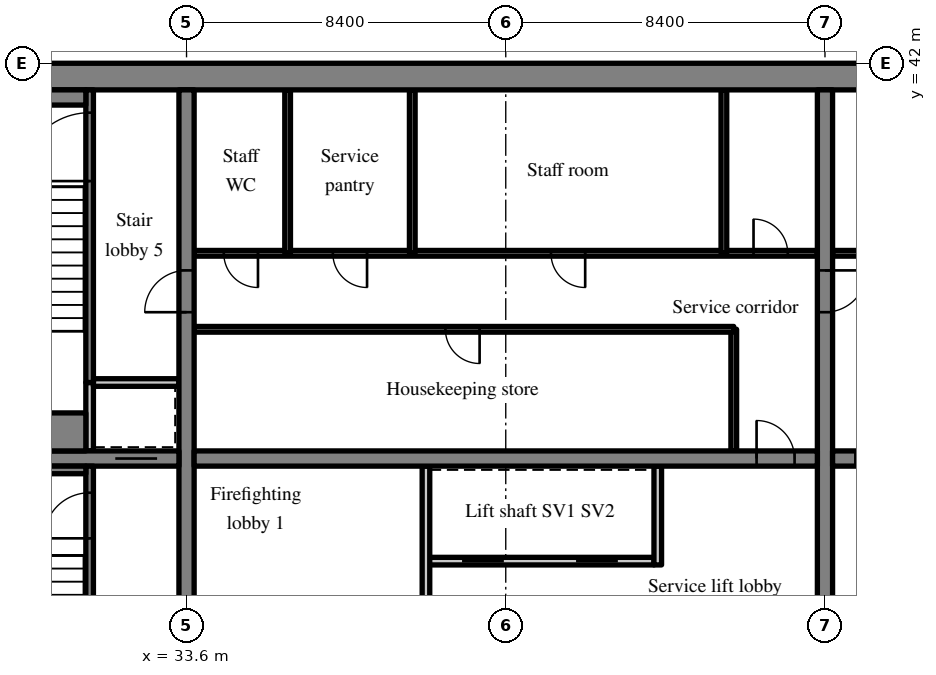
"""IFC4 building model, lengths in metres.
Left out: names, types, materials, properties, quantities, classifications, styles, units other than length and angle.
Written with IfcOpenShell. Run it as: python <this file> out.ifc"""

import sys

from ifc_helpers import new_model, si_unit, direction, frame, frame_2d, origin, place, context, subcontext, project, spatial, rectangle, extrude, source, transform, mapped, element, fill, save


model = new_model("IFC4")
c1 = context("Model", 3, precision=1e-05, world=origin(), true_north=direction((0.0, 1.0)))
c2 = subcontext(c1, "Body", "Model", "MODEL_VIEW")
j1 = project(units=[si_unit("LENGTHUNIT", "METRE"), si_unit("PLANEANGLEUNIT", "RADIAN")], contexts=[c1])
p1 = place(None, origin())
s1 = spatial("IfcSite", under=j1, at=p1, CompositionType="ELEMENT")
p2 = place(p1, origin())
s2 = spatial("IfcBuilding", under=s1, at=p2, CompositionType="ELEMENT")
p3 = place(p2, frame((0.0, 0.0, 151.6)))
s3 = spatial("IfcBuildingStorey", under=s2, at=p3, CompositionType="ELEMENT", Elevation=151.6)
m1 = source(origin(), c2, "Body", "SweptSolid", [
    extrude(rectangle(XDim=50.4, YDim=0.7, at=frame_2d((25.2, 0.0))), origin(), (0.0, 0.0, 1.0), 3.52),
])
p4 = place(p3, frame((25.2, 41.65, 0.0), z_axis=(0.0, 0.0, 1.0), x_axis=(1.0, 0.0, 0.0)))
e1 = element("IfcWall", 1, at=p4, inside=s3, PredefinedType="SHEAR", context=c2, shape_type="MappedRepresentation", body=[
    mapped(m1, transform((0.0, 0.0, 0.0), scale=1.0)),
])
m2 = source(origin(), c2, "Body", "SweptSolid", [
    extrude(rectangle(XDim=18.6, YDim=0.4, at=frame_2d((9.3, 0.0))), origin(), (0.0, 0.0, 1.0), 3.52),
])
p5 = place(p3, frame((33.6, 22.7, 0.0), z_axis=(0.0, 0.0, 1.0), x_axis=(0.0, 1.0, 0.0)))
e2 = element("IfcWall", 2, at=p5, inside=s3, PredefinedType="SHEAR", context=c2, shape_type="MappedRepresentation", body=[
    mapped(m2, transform((0.0, 0.0, 0.0), scale=1.0)),
])
m3 = source(origin(), c2, "Body", "SweptSolid", [
    extrude(rectangle(XDim=1.1, YDim=2.1, at=frame_2d((0.55, 1.05))), frame((0.0, 0.21, 0.0), z_axis=(0.0, -1.0, 0.0), x_axis=(1.0, 0.0, 0.0)), (0.0, 0.0, 1.0), 0.42),
])
p6 = place(p5, frame((12.75, 0.0, 0.0)))
e3 = element("IfcOpeningElement", 3, at=p6, cuts=e2, PredefinedType="OPENING", context=c2, shape_type="MappedRepresentation", body=[
    mapped(m3, transform((0.0, 0.0, 0.0), scale=1.0)),
])
p7 = place(p3, frame((50.4, 22.7, 0.0), z_axis=(0.0, 0.0, 1.0), x_axis=(0.0, 1.0, 0.0)))
e4 = element("IfcWall", 4, at=p7, inside=s3, PredefinedType="SHEAR", context=c2, shape_type="MappedRepresentation", body=[
    mapped(m2, transform((0.0, 0.0, 0.0), scale=1.0)),
])
p8 = place(p7, frame((12.75, 0.0, 0.0)))
e5 = element("IfcOpeningElement", 5, at=p8, cuts=e4, PredefinedType="OPENING", context=c2, shape_type="MappedRepresentation", body=[
    mapped(m3, transform((0.0, 0.0, 0.0), scale=1.0)),
])
m4 = source(origin(), c2, "Body", "SweptSolid", [
    extrude(rectangle(XDim=7.5, YDim=0.4, at=frame_2d((3.75, 0.0))), origin(), (0.0, 0.0, 1.0), 3.52),
])
p9 = place(p3, frame((25.9, 31.6, 0.0), z_axis=(0.0, 0.0, 1.0), x_axis=(1.0, 0.0, 0.0)))
e6 = element("IfcWall", 6, at=p9, inside=s3, PredefinedType="SHEAR", context=c2, shape_type="MappedRepresentation", body=[
    mapped(m4, transform((0.0, 0.0, 0.0), scale=1.0)),
])
p10 = place(p9, frame((5.825, 0.0, 0.0)))
e7 = element("IfcOpeningElement", 7, at=p10, cuts=e6, PredefinedType="OPENING", context=c2, shape_type="MappedRepresentation", body=[
    mapped(m3, transform((0.0, 0.0, 0.0), scale=1.0)),
])
m5 = source(origin(), c2, "Body", "SweptSolid", [
    extrude(rectangle(XDim=16.4, YDim=0.4, at=frame_2d((8.2, 0.0))), origin(), (0.0, 0.0, 1.0), 3.52),
])
p11 = place(p3, frame((33.8, 31.6, 0.0), z_axis=(0.0, 0.0, 1.0), x_axis=(1.0, 0.0, 0.0)))
e8 = element("IfcWall", 8, at=p11, inside=s3, PredefinedType="SHEAR", context=c2, shape_type="MappedRepresentation", body=[
    mapped(m5, transform((0.0, 0.0, 0.0), scale=1.0)),
])
m6 = source(origin(), c2, "Body", "SweptSolid", [
    extrude(rectangle(XDim=1.0, YDim=2.1, at=frame_2d((0.5, 1.05))), frame((0.0, 0.21, 0.0), z_axis=(0.0, -1.0, 0.0), x_axis=(1.0, 0.0, 0.0)), (0.0, 0.0, 1.0), 0.42),
])
p12 = place(p11, frame((14.8, 0.0, 0.0)))
e9 = element("IfcOpeningElement", 9, at=p12, cuts=e8, PredefinedType="OPENING", context=c2, shape_type="MappedRepresentation", body=[
    mapped(m6, transform((0.0, 0.0, 0.0), scale=1.0)),
])
p13 = place(p3, frame((50.6, 31.6, 0.0), z_axis=(0.0, 0.0, 1.0), x_axis=(1.0, 0.0, 0.0)))
e10 = element("IfcWall", 10, at=p13, inside=s3, PredefinedType="SHEAR", context=c2, shape_type="MappedRepresentation", body=[
    mapped(m5, transform((0.0, 0.0, 0.0), scale=1.0)),
])
p14 = place(p13, frame((0.6, 0.0, 0.0)))
e11 = element("IfcOpeningElement", 11, at=p14, cuts=e10, PredefinedType="OPENING", context=c2, shape_type="MappedRepresentation", body=[
    mapped(m6, transform((0.0, 0.0, 0.0), scale=1.0)),
])
m7 = source(origin(), c2, "Body", "SweptSolid", [
    extrude(rectangle(XDim=6.0, YDim=0.2, at=frame_2d((3.0, 0.0))), origin(), (0.0, 0.0, 1.0), 3.52),
])
p15 = place(p3, frame((39.9, 28.9, 0.0), z_axis=(0.0, 0.0, 1.0), x_axis=(1.0, 0.0, 0.0)))
e12 = element("IfcWall", 12, at=p15, inside=s3, PredefinedType="SOLIDWALL", context=c2, shape_type="MappedRepresentation", body=[
    mapped(m7, transform((0.0, 0.0, 0.0), scale=1.0)),
])
m8 = source(origin(), c2, "Body", "SweptSolid", [
    extrude(rectangle(XDim=1.1, YDim=2.1, at=frame_2d((0.55, 1.05))), frame((0.0, 0.11, 0.0), z_axis=(0.0, -1.0, 0.0), x_axis=(1.0, 0.0, 0.0)), (0.0, 0.0, 1.0), 0.22),
])
p16 = place(p15, frame((0.95, 0.0, 0.0)))
e13 = element("IfcOpeningElement", 13, at=p16, cuts=e12, PredefinedType="OPENING", context=c2, shape_type="MappedRepresentation", body=[
    mapped(m8, transform((0.0, 0.0, 0.0), scale=1.0)),
])
p17 = place(p15, frame((3.95, 0.0, 0.0)))
e14 = element("IfcOpeningElement", 14, at=p17, cuts=e12, PredefinedType="OPENING", context=c2, shape_type="MappedRepresentation", body=[
    mapped(m8, transform((0.0, 0.0, 0.0), scale=1.0)),
])
m9 = source(origin(), c2, "Body", "SweptSolid", [
    extrude(rectangle(XDim=8.7, YDim=0.2, at=frame_2d((4.35, 0.0))), origin(), (0.0, 0.0, 1.0), 3.52),
])
p18 = place(p3, frame((39.9, 22.7, 0.0), z_axis=(0.0, 0.0, 1.0), x_axis=(0.0, 1.0, 0.0)))
e15 = element("IfcWall", 15, at=p18, inside=s3, PredefinedType="PARTITIONING", context=c2, shape_type="MappedRepresentation", body=[
    mapped(m9, transform((0.0, 0.0, 0.0), scale=1.0)),
])
m10 = source(origin(), c2, "Body", "SweptSolid", [
    extrude(rectangle(XDim=0.9, YDim=2.1, at=frame_2d((0.45, 1.05))), frame((0.0, 0.11, 0.0), z_axis=(0.0, -1.0, 0.0), x_axis=(1.0, 0.0, 0.0)), (0.0, 0.0, 1.0), 0.22),
])
p19 = place(p18, frame((3.85, 0.0, 0.0)))
e16 = element("IfcOpeningElement", 16, at=p19, cuts=e15, PredefinedType="OPENING", context=c2, shape_type="MappedRepresentation", body=[
    mapped(m10, transform((0.0, 0.0, 0.0), scale=1.0)),
])
m11 = source(origin(), c2, "Body", "SweptSolid", [
    extrude(rectangle(XDim=2.6, YDim=0.2, at=frame_2d((1.3, 0.0))), origin(), (0.0, 0.0, 1.0), 3.52),
])
p20 = place(p3, frame((46.0, 28.8, 0.0), z_axis=(0.0, 0.0, 1.0), x_axis=(0.0, 1.0, 0.0)))
e17 = element("IfcWall", 17, at=p20, inside=s3, PredefinedType="SOLIDWALL", context=c2, shape_type="MappedRepresentation", body=[
    mapped(m11, transform((0.0, 0.0, 0.0), scale=1.0)),
])
m12 = source(origin(), c2, "Body", "SweptSolid", [
    extrude(rectangle(XDim=3.2, YDim=0.15, at=frame_2d((1.6, 0.0))), origin(), (0.0, 0.0, 1.0), 3.52),
])
p21 = place(p3, frame((48.0, 31.8, 0.0), z_axis=(0.0, 0.0, 1.0), x_axis=(0.0, 1.0, 0.0)))
e18 = element("IfcWall", 18, at=p21, inside=s3, PredefinedType="PARTITIONING", context=c2, shape_type="MappedRepresentation", body=[
    mapped(m12, transform((0.0, 0.0, 0.0), scale=1.0)),
])
m13 = source(origin(), c2, "Body", "SweptSolid", [
    extrude(rectangle(XDim=14.2, YDim=0.15, at=frame_2d((7.1, 0.0))), origin(), (0.0, 0.0, 1.0), 3.52),
])
p22 = place(p3, frame((33.8, 35.0, 0.0), z_axis=(0.0, 0.0, 1.0), x_axis=(1.0, 0.0, 0.0)))
e19 = element("IfcWall", 19, at=p22, inside=s3, PredefinedType="PARTITIONING", context=c2, shape_type="MappedRepresentation", body=[
    mapped(m13, transform((0.0, 0.0, 0.0), scale=1.0)),
])
m14 = source(origin(), c2, "Body", "SweptSolid", [
    extrude(rectangle(XDim=0.9, YDim=2.1, at=frame_2d((0.45, 1.05))), frame((0.0, 0.085, 0.0), z_axis=(0.0, -1.0, 0.0), x_axis=(1.0, 0.0, 0.0)), (0.0, 0.0, 1.0), 0.17),
])
p23 = place(p22, frame((6.612, 0.0, 0.0)))
e20 = element("IfcOpeningElement", 20, at=p23, cuts=e19, PredefinedType="OPENING", context=c2, shape_type="MappedRepresentation", body=[
    mapped(m14, transform((0.0, 0.0, 0.0), scale=1.0)),
])
m15 = source(origin(), c2, "Body", "SweptSolid", [
    extrude(rectangle(XDim=16.4, YDim=0.15, at=frame_2d((8.2, 0.0))), origin(), (0.0, 0.0, 1.0), 3.52),
])
p24 = place(p3, frame((33.8, 37.0, 0.0), z_axis=(0.0, 0.0, 1.0), x_axis=(1.0, 0.0, 0.0)))
e21 = element("IfcWall", 21, at=p24, inside=s3, PredefinedType="PARTITIONING", context=c2, shape_type="MappedRepresentation", body=[
    mapped(m15, transform((0.0, 0.0, 0.0), scale=1.0)),
])
p25 = place(p24, frame((0.78, 0.0, 0.0)))
e22 = element("IfcOpeningElement", 22, at=p25, cuts=e21, PredefinedType="OPENING", context=c2, shape_type="MappedRepresentation", body=[
    mapped(m14, transform((0.0, 0.0, 0.0), scale=1.0)),
])
p26 = place(p24, frame((3.65, 0.0, 0.0)))
e23 = element("IfcOpeningElement", 23, at=p26, cuts=e21, PredefinedType="OPENING", context=c2, shape_type="MappedRepresentation", body=[
    mapped(m14, transform((0.0, 0.0, 0.0), scale=1.0)),
])
p27 = place(p24, frame((9.39, 0.0, 0.0)))
e24 = element("IfcOpeningElement", 24, at=p27, cuts=e21, PredefinedType="OPENING", context=c2, shape_type="MappedRepresentation", body=[
    mapped(m14, transform((0.0, 0.0, 0.0), scale=1.0)),
])
p28 = place(p24, frame((14.72, 0.0, 0.0)))
e25 = element("IfcOpeningElement", 25, at=p28, cuts=e21, PredefinedType="OPENING", context=c2, shape_type="MappedRepresentation", body=[
    mapped(m14, transform((0.0, 0.0, 0.0), scale=1.0)),
])
m16 = source(origin(), c2, "Body", "SweptSolid", [
    extrude(rectangle(XDim=4.3, YDim=0.15, at=frame_2d((2.15, 0.0))), origin(), (0.0, 0.0, 1.0), 3.52),
])
for number, where, z_axis, x_axis in (
    (26, (36.26, 37.0, 0.0), (0.0, 0.0, 1.0), (0.0, 1.0, 0.0)),
    (27, (39.54, 37.0, 0.0), (0.0, 0.0, 1.0), (0.0, 1.0, 0.0)),
    (28, (47.74, 37.0, 0.0), (0.0, 0.0, 1.0), (0.0, 1.0, 0.0)),
):
    element("IfcWall", number, at=place(p3, frame(where, z_axis=z_axis, x_axis=x_axis)), inside=s3, PredefinedType="PARTITIONING", context=c2, shape_type="MappedRepresentation", body=[
        mapped(m16, transform((0.0, 0.0, 0.0), scale=1.0)),
    ])
p29 = place(p3, frame((67.0, 37.0, 0.0), z_axis=(0.0, 0.0, 1.0), x_axis=(-1.0, 0.0, 0.0)))
e29 = element("IfcWall", 29, at=p29, inside=s3, PredefinedType="PARTITIONING", context=c2, shape_type="MappedRepresentation", body=[
    mapped(m15, transform((0.0, 0.0, 0.0), scale=1.0)),
])
p30 = place(p29, frame((6.52, 0.0, 0.0)))
e30 = element("IfcOpeningElement", 30, at=p30, cuts=e29, PredefinedType="OPENING", context=c2, shape_type="MappedRepresentation", body=[
    mapped(m14, transform((0.0, 0.0, 0.0), scale=1.0)),
])
p31 = place(p29, frame((14.72, 0.0, 0.0)))
e31 = element("IfcOpeningElement", 31, at=p31, cuts=e29, PredefinedType="OPENING", context=c2, shape_type="MappedRepresentation", body=[
    mapped(m14, transform((0.0, 0.0, 0.0), scale=1.0)),
])
m17 = source(origin(), c2, "Body", "SweptSolid", [
    extrude(rectangle(XDim=8.7, YDim=0.2, at=frame_2d((4.35, 0.0))), origin(), (0.0, 0.0, 1.0), 3.52),
])
p32 = place(p3, frame((31.05, 22.7, 0.0), z_axis=(0.0, 0.0, 1.0), x_axis=(0.0, 1.0, 0.0)))
e32 = element("IfcWall", 32, at=p32, inside=s3, PredefinedType="SOLIDWALL", context=c2, shape_type="MappedRepresentation", body=[
    mapped(m17, transform((0.0, 0.0, 0.0), scale=1.0)),
])
m18 = source(origin(), c2, "Body", "SweptSolid", [
    extrude(rectangle(XDim=1.2, YDim=2.1, at=frame_2d((0.6, 1.05))), frame((0.0, 0.11, 0.0), z_axis=(0.0, -1.0, 0.0), x_axis=(1.0, 0.0, 0.0)), (0.0, 0.0, 1.0), 0.22),
])
p33 = place(p32, frame((6.8, 0.0, 0.0)))
e33 = element("IfcOpeningElement", 33, at=p33, cuts=e32, PredefinedType="OPENING", context=c2, shape_type="MappedRepresentation", body=[
    mapped(m18, transform((0.0, 0.0, 0.0), scale=1.0)),
])
m19 = source(origin(), c2, "Body", "SweptSolid", [
    extrude(rectangle(XDim=1.8, YDim=0.2, at=frame_2d((0.9, 0.0))), origin(), (0.0, 0.0, 1.0), 3.52),
])
p34 = place(p3, frame((31.05, 31.8, 0.0), z_axis=(0.0, 0.0, 1.0), x_axis=(0.0, 1.0, 0.0)))
e34 = element("IfcWall", 34, at=p34, inside=s3, PredefinedType="SOLIDWALL", context=c2, shape_type="MappedRepresentation", body=[
    mapped(m19, transform((0.0, 0.0, 0.0), scale=1.0)),
])
m20 = source(origin(), c2, "Body", "SweptSolid", [
    extrude(rectangle(XDim=2.25, YDim=0.2, at=frame_2d((1.125, 0.0))), origin(), (0.0, 0.0, 1.0), 3.52),
])
p35 = place(p3, frame((31.15, 33.6, 0.0), z_axis=(0.0, 0.0, 1.0), x_axis=(1.0, 0.0, 0.0)))
e35 = element("IfcWall", 35, at=p35, inside=s3, PredefinedType="SOLIDWALL", context=c2, shape_type="MappedRepresentation", body=[
    mapped(m20, transform((0.0, 0.0, 0.0), scale=1.0)),
])
m21 = source(origin(), c2, "Body", "SweptSolid", [
    extrude(rectangle(XDim=7.7, YDim=0.2, at=frame_2d((3.85, 0.0))), origin(), (0.0, 0.0, 1.0), 3.52),
])
p36 = place(p3, frame((31.05, 33.6, 0.0), z_axis=(0.0, 0.0, 1.0), x_axis=(0.0, 1.0, 0.0)))
e36 = element("IfcWall", 36, at=p36, inside=s3, PredefinedType="SOLIDWALL", context=c2, shape_type="MappedRepresentation", body=[
    mapped(m21, transform((0.0, 0.0, 0.0), scale=1.0)),
])
m22 = source(origin(), c2, "Body", "SweptSolid", [
    extrude(rectangle(XDim=1.8, YDim=2.1, at=frame_2d((0.9, 1.05))), frame((0.0, 0.11, 0.0), z_axis=(0.0, -1.0, 0.0), x_axis=(1.0, 0.0, 0.0)), (0.0, 0.0, 1.0), 0.22),
])
p37 = place(p36, frame((5.3, 0.0, 0.0)))
e37 = element("IfcOpeningElement", 37, at=p37, cuts=e36, PredefinedType="OPENING", context=c2, shape_type="MappedRepresentation", body=[
    mapped(m22, transform((0.0, 0.0, 0.0), scale=1.0)),
])
m23 = source(origin(), c2, "Body", "SweptSolid", [
    extrude(rectangle(XDim=5.05, YDim=0.2, at=frame_2d((2.525, 0.0))), origin(), (0.0, 0.0, 1.0), 3.52),
])
p38 = place(p3, frame((25.9, 31.3, 0.0), z_axis=(0.0, 0.0, 1.0), x_axis=(1.0, 0.0, 0.0)))
e38 = element("IfcWall", 38, at=p38, inside=s3, PredefinedType="SOLIDWALL", context=c2, shape_type="MappedRepresentation", body=[
    mapped(m23, transform((0.0, 0.0, 0.0), scale=1.0)),
])
m24 = source(origin(), c2, "Body", "SweptSolid", [
    extrude(rectangle(XDim=5.05, YDim=0.4, at=frame_2d((2.525, 0.0))), origin(), (0.0, 0.0, 1.0), 3.52),
])
p39 = place(p3, frame((25.9, 41.1, 0.0), z_axis=(0.0, 0.0, 1.0), x_axis=(1.0, 0.0, 0.0)))
e39 = element("IfcWall", 39, at=p39, inside=s3, PredefinedType="SOLIDWALL", context=c2, shape_type="MappedRepresentation", body=[
    mapped(m24, transform((0.0, 0.0, 0.0), scale=1.0)),
])
m25 = source(origin(), c2, "Body", "SweptSolid", [
    extrude(rectangle(XDim=5.05, YDim=1.0, at=frame_2d((2.525, 0.0))), origin(), (0.0, 0.0, 1.0), 3.52),
])
p40 = place(p3, frame((25.9, 32.3, 0.0), z_axis=(0.0, 0.0, 1.0), x_axis=(1.0, 0.0, 0.0)))
e40 = element("IfcWall", 40, at=p40, inside=s3, PredefinedType="SOLIDWALL", context=c2, shape_type="MappedRepresentation", body=[
    mapped(m25, transform((0.0, 0.0, 0.0), scale=1.0)),
])
m26 = source(origin(), c2, "Body", "SweptSolid", [
    extrude(rectangle(XDim=1.0, YDim=2.1, at=frame_2d((0.5, 1.05))), frame((0.0, 0.025, 0.0), z_axis=(0.0, -1.0, 0.0), x_axis=(1.0, 0.0, 0.0)), (0.0, 0.0, 1.0), 0.05),
])
p41 = place(p12, origin())
e41 = element("IfcDoor", 41, at=p41, inside=s3, OperationType="SINGLE_SWING_LEFT", PredefinedType="DOOR", context=c2, shape_type="MappedRepresentation", body=[
    mapped(m26, transform((0.0, 0.0, 0.0), scale=1.0)),
])
fill(e9, e41)
m27 = source(origin(), c2, "Body", "SweptSolid", [
    extrude(rectangle(XDim=1.1, YDim=2.1, at=frame_2d((0.55, 1.05))), frame((0.0, 0.025, 0.0), z_axis=(0.0, -1.0, 0.0), x_axis=(1.0, 0.0, 0.0)), (0.0, 0.0, 1.0), 0.05),
])
p42 = place(p16, origin())
e42 = element("IfcDoor", 42, at=p42, inside=s3, OperationType="SLIDING_TO_LEFT", PredefinedType="DOOR", context=c2, shape_type="MappedRepresentation", body=[
    mapped(m27, transform((0.0, 0.0, 0.0), scale=1.0)),
])
fill(e13, e42)
p43 = place(p17, origin())
e43 = element("IfcDoor", 43, at=p43, inside=s3, OperationType="SLIDING_TO_RIGHT", PredefinedType="DOOR", context=c2, shape_type="MappedRepresentation", body=[
    mapped(m27, transform((0.0, 0.0, 0.0), scale=1.0)),
])
fill(e14, e43)
m28 = source(origin(), c2, "Body", "SweptSolid", [
    extrude(rectangle(XDim=0.9, YDim=2.1, at=frame_2d((0.45, 1.05))), frame((0.0, 0.025, 0.0), z_axis=(0.0, -1.0, 0.0), x_axis=(1.0, 0.0, 0.0)), (0.0, 0.0, 1.0), 0.05),
])
p44 = place(p23, origin())
e44 = element("IfcDoor", 44, at=p44, inside=s3, OperationType="SINGLE_SWING_RIGHT", PredefinedType="DOOR", context=c2, shape_type="MappedRepresentation", body=[
    mapped(m28, transform((0.0, 0.0, 0.0), scale=1.0)),
])
fill(e20, e44)
p45 = place(p25, origin())
e45 = element("IfcDoor", 45, at=p45, inside=s3, OperationType="SINGLE_SWING_RIGHT", PredefinedType="DOOR", context=c2, shape_type="MappedRepresentation", body=[
    mapped(m28, transform((0.0, 0.0, 0.0), scale=1.0)),
])
fill(e22, e45)
p46 = place(p26, origin())
e46 = element("IfcDoor", 46, at=p46, inside=s3, OperationType="SINGLE_SWING_RIGHT", PredefinedType="DOOR", context=c2, shape_type="MappedRepresentation", body=[
    mapped(m28, transform((0.0, 0.0, 0.0), scale=1.0)),
])
fill(e23, e46)
p47 = place(p27, origin())
e47 = element("IfcDoor", 47, at=p47, inside=s3, OperationType="SINGLE_SWING_RIGHT", PredefinedType="DOOR", context=c2, shape_type="MappedRepresentation", body=[
    mapped(m28, transform((0.0, 0.0, 0.0), scale=1.0)),
])
fill(e24, e47)
p48 = place(p28, origin())
e48 = element("IfcDoor", 48, at=p48, inside=s3, OperationType="SINGLE_SWING_LEFT", PredefinedType="DOOR", context=c2, shape_type="MappedRepresentation", body=[
    mapped(m28, transform((0.0, 0.0, 0.0), scale=1.0)),
])
fill(e25, e48)
m29 = source(origin(), c2, "Body", "SweptSolid", [
    extrude(rectangle(XDim=1.2, YDim=2.1, at=frame_2d((0.6, 1.05))), frame((0.0, 0.025, 0.0), z_axis=(0.0, -1.0, 0.0), x_axis=(1.0, 0.0, 0.0)), (0.0, 0.0, 1.0), 0.05),
])
p49 = place(p33, origin())
e49 = element("IfcDoor", 49, at=p49, inside=s3, OperationType="SINGLE_SWING_LEFT", PredefinedType="DOOR", context=c2, shape_type="MappedRepresentation", body=[
    mapped(m29, transform((0.0, 0.0, 0.0), scale=1.0)),
])
fill(e33, e49)
p50 = place(p10, origin())
e50 = element("IfcDoor", 50, at=p50, inside=s3, OperationType="SLIDING_TO_RIGHT", PredefinedType="DOOR", context=c2, shape_type="MappedRepresentation", body=[
    mapped(m27, transform((0.0, 0.0, 0.0), scale=1.0)),
])
fill(e7, e50)
m30 = source(origin(), c2, "Body", "SweptSolid", [
    extrude(rectangle(XDim=1.8, YDim=2.1, at=frame_2d((0.9, 1.05))), frame((0.0, 0.025, 0.0), z_axis=(0.0, -1.0, 0.0), x_axis=(1.0, 0.0, 0.0)), (0.0, 0.0, 1.0), 0.05),
])
p51 = place(p37, origin())
e51 = element("IfcDoor", 51, at=p51, inside=s3, OperationType="SINGLE_SWING_LEFT", PredefinedType="DOOR", context=c2, shape_type="MappedRepresentation", body=[
    mapped(m30, transform((0.0, 0.0, 0.0), scale=1.0)),
])
fill(e37, e51)
p52 = place(p6, origin())
e52 = element("IfcDoor", 52, at=p52, inside=s3, OperationType="SINGLE_SWING_LEFT", PredefinedType="DOOR", context=c2, shape_type="MappedRepresentation", body=[
    mapped(m27, transform((0.0, 0.0, 0.0), scale=1.0)),
])
fill(e3, e52)
p53 = place(p8, origin())
e53 = element("IfcDoor", 53, at=p53, inside=s3, OperationType="SINGLE_SWING_RIGHT", PredefinedType="DOOR", context=c2, shape_type="MappedRepresentation", body=[
    mapped(m27, transform((0.0, 0.0, 0.0), scale=1.0)),
])
fill(e5, e53)
save(model, sys.argv[1])
